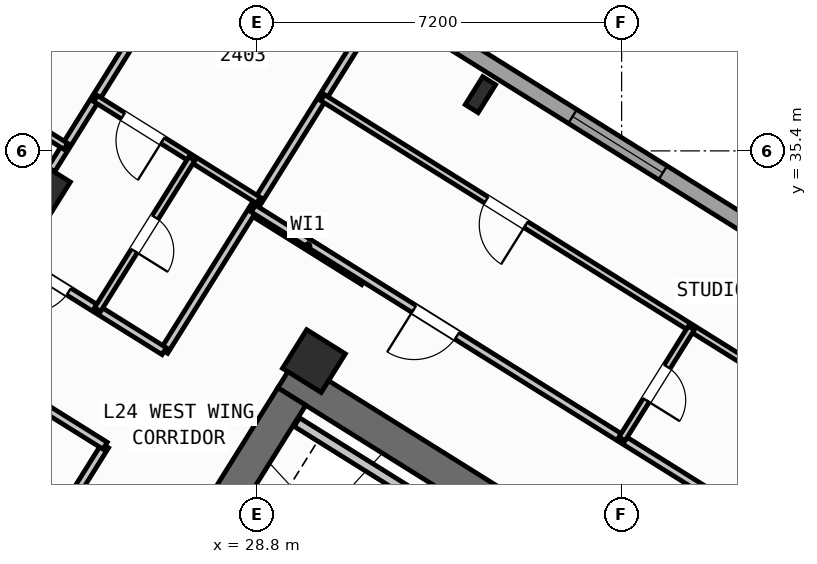
"""IFC4 building model, lengths in metres.
Left out: names, types, materials, properties, quantities, classifications, styles, units other than length and angle.
Written with IfcOpenShell. Run it as: python <this file> out.ifc"""

import sys

from ifc_helpers import new_model, si_unit, direction, frame, frame_2d, origin, origin_2d, place, context, subcontext, project, spatial, rectangle, hollow_rectangle, i_section, extrude, source, transform, mapped, element, fill, save


model = new_model("IFC4")
c1 = context("Model", 3, precision=1e-05, world=origin(), true_north=direction((0.0, 1.0)))
c2 = subcontext(c1, "Body", "Model", "MODEL_VIEW")
j1 = project(units=[si_unit("LENGTHUNIT", "METRE"), si_unit("PLANEANGLEUNIT", "RADIAN")], contexts=[c1])
p1 = place(None, origin())
s1 = spatial("IfcSite", under=j1, at=p1, CompositionType="ELEMENT")
p2 = place(p1, origin())
s2 = spatial("IfcBuilding", under=s1, at=p2, CompositionType="ELEMENT")
p3 = place(p2, frame((0.0, 0.0, 97.2)))
s3 = spatial("IfcBuildingStorey", under=s2, at=p3, CompositionType="ELEMENT", Elevation=97.2)
p4 = place(p3, frame((40.615, 23.983, 0.0), z_axis=(0.0, 0.0, 1.0), x_axis=(-0.848045953968, 0.529922692436, 0.0)))
e1 = element("IfcWall", 1, at=p4, inside=s3, PredefinedType="SHEAR", context=c2, shape_type="SweptSolid", body=[
    extrude(rectangle(XDim=13.24, YDim=0.65, at=frame_2d((6.62, 0.0))), origin(), (0.0, 0.0, 1.0), 3.32),
])
p5 = place(p3, frame((29.491, 30.552, 0.0), z_axis=(0.0, 0.0, 1.0), x_axis=(-0.529893103397, -0.8480644427, 0.0)))
e2 = element("IfcWall", 2, at=p5, inside=s3, PredefinedType="SHEAR", context=c2, shape_type="SweptSolid", body=[
    extrude(rectangle(XDim=3.525, YDim=0.65, at=frame_2d((1.763, 0.0))), origin(), (0.0, 0.0, 1.0), 3.32),
])
m1 = source(origin(), c2, "Body", "SweptSolid", [
    extrude(i_section(OverallWidth=0.3, OverallDepth=0.65, WebThickness=0.016, FlangeThickness=0.031, at=origin_2d()), origin(), (0.0, 0.0, 1.0), 3.6),
])
p6 = place(p3, frame((33.213, 36.509, 0.0), z_axis=(0.0, 0.0, 1.0), x_axis=(-0.848048096156, 0.529919264233, 0.0)))
e3 = element("IfcColumn", 3, at=p6, inside=s3, PredefinedType="COLUMN", context=c2, shape_type="MappedRepresentation", body=[
    mapped(m1, transform((0.0, 0.0, 0.0), scale=1.0)),
])
m2 = source(origin(), c2, "Body", "SweptSolid", [
    extrude(hollow_rectangle(XDim=0.9, YDim=0.9, WallThickness=0.036, at=origin_2d()), origin(), (0.0, 0.0, 1.0), 3.6),
])
for number, where, z_axis, x_axis in (
    (4, (29.928, 31.251, 0.0), (0.0, 0.0, 1.0), (-0.848, 0.53, 0.0)),
    (5, (24.5, 34.643, 0.0), (0.0, 0.0, 1.0), (-0.848, 0.53, 0.0)),
):
    element("IfcColumn", number, at=place(p3, frame(where, z_axis=z_axis, x_axis=x_axis)), inside=s3, PredefinedType="COLUMN", context=c2, shape_type="MappedRepresentation", body=[
        mapped(m2, transform((0.0, 0.0, 0.0), scale=1.0)),
    ])
p7 = place(p3, frame((17.424, 47.083, 0.0), z_axis=(0.0, 0.0, 1.0), x_axis=(0.848049927979, -0.529916332693, 0.0)))
e6 = element("IfcWall", 6, at=p7, inside=s3, PredefinedType="STANDARD", context=c2, shape_type="SweptSolid", body=[
    extrude(rectangle(XDim=29.223, YDim=0.32, at=frame_2d((14.612, 0.0))), origin(), (0.0, 0.0, 1.0), 3.32),
])
p8 = place(p7, frame((3.745, 0.0, 0.0)))
e7 = element("IfcOpeningElement", 7, at=p8, cuts=e6, PredefinedType="OPENING", context=c2, shape_type="SweptSolid", body=[
    extrude(rectangle(XDim=1.05, YDim=2.15, at=frame_2d((0.525, 1.075))), frame((0.0, 0.17, 0.0), z_axis=(0.0, -1.0, 0.0), x_axis=(1.0, 0.0, 0.0)), (0.0, 0.0, 1.0), 0.34),
])
p9 = place(p7, frame((0.699, 0.0, 0.95)))
e8 = element("IfcOpeningElement", 8, at=p9, cuts=e6, PredefinedType="OPENING", context=c2, shape_type="SweptSolid", body=[
    extrude(rectangle(XDim=1.2, YDim=1.4, at=frame_2d((0.6, 0.7))), frame((0.0, 0.17, 0.0), z_axis=(0.0, -1.0, 0.0), x_axis=(1.0, 0.0, 0.0)), (0.0, 0.0, 1.0), 0.34),
])
p10 = place(p7, frame((6.951, 0.0, 1.0)))
e9 = element("IfcOpeningElement", 9, at=p10, cuts=e6, PredefinedType="OPENING", context=c2, shape_type="SweptSolid", body=[
    extrude(rectangle(XDim=0.9, YDim=1.25, at=frame_2d((0.45, 0.625))), frame((0.0, 0.17, 0.0), z_axis=(0.0, -1.0, 0.0), x_axis=(1.0, 0.0, 0.0)), (0.0, 0.0, 1.0), 0.34),
])
p11 = place(p7, frame((9.841, 0.0, 0.85)))
e10 = element("IfcOpeningElement", 10, at=p11, cuts=e6, PredefinedType="OPENING", context=c2, shape_type="SweptSolid", body=[
    extrude(rectangle(XDim=1.5, YDim=1.5, at=frame_2d((0.75, 0.75))), frame((0.0, 0.17, 0.0), z_axis=(0.0, -1.0, 0.0), x_axis=(1.0, 0.0, 0.0)), (0.0, 0.0, 1.0), 0.34),
])
p12 = place(p7, frame((13.889, 0.0, 0.95)))
e11 = element("IfcOpeningElement", 11, at=p12, cuts=e6, PredefinedType="OPENING", context=c2, shape_type="SweptSolid", body=[
    extrude(rectangle(XDim=1.2, YDim=1.4, at=frame_2d((0.6, 0.7))), frame((0.0, 0.17, 0.0), z_axis=(0.0, -1.0, 0.0), x_axis=(1.0, 0.0, 0.0)), (0.0, 0.0, 1.0), 0.34),
])
p13 = place(p7, frame((17.254, 0.0, 1.0)))
e12 = element("IfcOpeningElement", 12, at=p13, cuts=e6, PredefinedType="OPENING", context=c2, shape_type="SweptSolid", body=[
    extrude(rectangle(XDim=0.9, YDim=1.25, at=frame_2d((0.45, 0.625))), frame((0.0, 0.17, 0.0), z_axis=(0.0, -1.0, 0.0), x_axis=(1.0, 0.0, 0.0)), (0.0, 0.0, 1.0), 0.34),
])
p14 = place(p7, frame((20.764, 0.0, 0.8)))
e13 = element("IfcOpeningElement", 13, at=p14, cuts=e6, PredefinedType="OPENING", context=c2, shape_type="SweptSolid", body=[
    extrude(rectangle(XDim=2.1, YDim=1.55, at=frame_2d((1.05, 0.775))), frame((0.0, 0.17, 0.0), z_axis=(0.0, -1.0, 0.0), x_axis=(1.0, 0.0, 0.0)), (0.0, 0.0, 1.0), 0.34),
])
p15 = place(p7, frame((25.403, 0.0, 0.8)))
e14 = element("IfcOpeningElement", 14, at=p15, cuts=e6, PredefinedType="OPENING", context=c2, shape_type="SweptSolid", body=[
    extrude(rectangle(XDim=2.1, YDim=1.55, at=frame_2d((1.05, 0.775))), frame((0.0, 0.17, 0.0), z_axis=(0.0, -1.0, 0.0), x_axis=(1.0, 0.0, 0.0)), (0.0, 0.0, 1.0), 0.34),
])
p16 = place(p3, frame((33.363, 27.69, 0.0), z_axis=(0.0, 0.0, 1.0), x_axis=(-0.848053806312, 0.529910125964, 0.0)))
e15 = element("IfcWall", 15, at=p16, inside=s3, PredefinedType="STANDARD", context=c2, shape_type="SweptSolid", body=[
    extrude(rectangle(XDim=4.448, YDim=0.2, at=frame_2d((2.224, 0.0))), origin(), (0.0, 0.0, 1.0), 3.31),
])
p17 = place(p3, frame((30.914, 32.829, 0.0), z_axis=(0.0, 0.0, 1.0), x_axis=(-0.848008813643, 0.529982124211, 0.0)))
e16 = element("IfcWall", 16, at=p17, inside=s3, PredefinedType="PARTITIONING", context=c2, shape_type="SweptSolid", body=[
    extrude(rectangle(XDim=2.61, YDim=0.16, at=frame_2d((1.305, 0.0))), origin(), (0.0, 0.0, 1.0), 3.31),
])
p18 = place(p3, frame((31.239, 38.274, 0.0), z_axis=(0.0, 0.0, 1.0), x_axis=(-0.529928058306, -0.848042600947, 0.0)))
e17 = element("IfcWall", 17, at=p18, inside=s3, PredefinedType="PARTITIONING", context=c2, shape_type="SweptSolid", body=[
    extrude(rectangle(XDim=8.05, YDim=0.16, at=frame_2d((4.025, 0.0))), origin(), (0.0, 0.0, 1.0), 3.31),
])
p19 = place(p3, frame((25.807, 29.582, 0.0), z_axis=(0.0, 0.0, 1.0), x_axis=(-0.529920357077, -0.848047413271, 0.0)))
e18 = element("IfcWall", 18, at=p19, inside=s3, PredefinedType="PARTITIONING", context=c2, shape_type="SweptSolid", body=[
    extrude(rectangle(XDim=11.45, YDim=0.16, at=frame_2d((5.725, 0.0))), origin(), (0.0, 0.0, 1.0), 3.31),
])
p20 = place(p3, frame((26.973, 31.447, 0.0), z_axis=(0.0, 0.0, 1.0), x_axis=(-0.848048310262, 0.529918921593, 0.0)))
e19 = element("IfcWall", 19, at=p20, inside=s3, PredefinedType="PARTITIONING", context=c2, shape_type="SweptSolid", body=[
    extrude(rectangle(XDim=16.73, YDim=0.16, at=frame_2d((8.365, 0.0))), origin(), (0.0, 0.0, 1.0), 3.31),
])
p21 = place(p20, frame((2.22, 0.0, 0.0)))
e20 = element("IfcOpeningElement", 20, at=p21, cuts=e19, PredefinedType="OPENING", context=c2, shape_type="SweptSolid", body=[
    extrude(rectangle(XDim=0.86, YDim=2.05, at=frame_2d((0.43, 1.025))), frame((0.0, 0.09, 0.0), z_axis=(0.0, -1.0, 0.0), x_axis=(1.0, 0.0, 0.0)), (0.0, 0.0, 1.0), 0.18),
])
p22 = place(p20, frame((5.28, 0.0, 0.0)))
e21 = element("IfcOpeningElement", 21, at=p22, cuts=e19, PredefinedType="OPENING", context=c2, shape_type="SweptSolid", body=[
    extrude(rectangle(XDim=1.0, YDim=2.1, at=frame_2d((0.5, 1.05))), frame((0.0, 0.09, 0.0), z_axis=(0.0, -1.0, 0.0), x_axis=(1.0, 0.0, 0.0)), (0.0, 0.0, 1.0), 0.18),
])
p23 = place(p3, frame((25.807, 29.582, 0.0), z_axis=(0.0, 0.0, 1.0), x_axis=(-0.848052408131, 0.529912363569, 0.0)))
e22 = element("IfcWall", 22, at=p23, inside=s3, PredefinedType="PARTITIONING", context=c2, shape_type="SweptSolid", body=[
    extrude(rectangle(XDim=16.73, YDim=0.16, at=frame_2d((8.365, 0.0))), origin(), (0.0, 0.0, 1.0), 3.31),
])
p24 = place(p23, frame((2.22, 0.0, 0.0)))
e23 = element("IfcOpeningElement", 23, at=p24, cuts=e22, PredefinedType="OPENING", context=c2, shape_type="SweptSolid", body=[
    extrude(rectangle(XDim=0.86, YDim=2.05, at=frame_2d((0.43, 1.025))), frame((0.0, 0.09, 0.0), z_axis=(0.0, -1.0, 0.0), x_axis=(1.0, 0.0, 0.0)), (0.0, 0.0, 1.0), 0.18),
])
p25 = place(p23, frame((14.013, 0.0, 0.0)))
e24 = element("IfcOpeningElement", 24, at=p25, cuts=e22, PredefinedType="OPENING", context=c2, shape_type="SweptSolid", body=[
    extrude(rectangle(XDim=1.0, YDim=2.1, at=frame_2d((0.5, 1.05))), frame((0.0, 0.09, 0.0), z_axis=(0.0, -1.0, 0.0), x_axis=(1.0, 0.0, 0.0)), (0.0, 0.0, 1.0), 0.18),
])
p26 = place(p3, frame((27.607, 39.615, 0.0), z_axis=(0.0, 0.0, 1.0), x_axis=(-0.529913610495, -0.848051628978, 0.0)))
e25 = element("IfcWall", 25, at=p26, inside=s3, PredefinedType="PARTITIONING", context=c2, shape_type="SweptSolid", body=[
    extrude(rectangle(XDim=5.401, YDim=0.16, at=frame_2d((2.7, 0.0))), origin(), (0.0, 0.0, 1.0), 2.745),
])
p27 = place(p3, frame((28.833, 34.424, 0.0), z_axis=(0.0, 0.0, 1.0), x_axis=(-0.848059820872, 0.529900500304, 0.0)))
e26 = element("IfcWall", 26, at=p27, inside=s3, PredefinedType="PLUMBINGWALL", context=c2, shape_type="SweptSolid", body=[
    extrude(rectangle(XDim=3.79, YDim=0.14, at=frame_2d((1.895, 0.0))), origin(), (0.0, 0.0, 1.0), 3.31),
])
p28 = place(p27, frame((2.23, 0.0, 0.0)))
e27 = element("IfcOpeningElement", 27, at=p28, cuts=e26, PredefinedType="OPENING", context=c2, shape_type="SweptSolid", body=[
    extrude(rectangle(XDim=0.92, YDim=2.08, at=frame_2d((0.46, 1.04))), frame((0.0, 0.08, 0.0), z_axis=(0.0, -1.0, 0.0), x_axis=(1.0, 0.0, 0.0)), (0.0, 0.0, 1.0), 0.16),
])
p29 = place(p3, frame((27.518, 35.245, 0.0), z_axis=(0.0, 0.0, 1.0), x_axis=(-0.529948921118, -0.848029563757, 0.0)))
e28 = element("IfcWall", 28, at=p29, inside=s3, PredefinedType="PLUMBINGWALL", context=c2, shape_type="SweptSolid", body=[
    extrude(rectangle(XDim=3.51, YDim=0.14, at=frame_2d((1.755, 0.0))), origin(), (0.0, 0.0, 1.0), 2.935),
])
p30 = place(p29, frame((1.365, 0.0, 0.0)))
e29 = element("IfcOpeningElement", 29, at=p30, cuts=e28, PredefinedType="OPENING", context=c2, shape_type="SweptSolid", body=[
    extrude(rectangle(XDim=0.78, YDim=2.05, at=frame_2d((0.39, 1.025))), frame((0.0, 0.08, 0.0), z_axis=(0.0, -1.0, 0.0), x_axis=(1.0, 0.0, 0.0)), (0.0, 0.0, 1.0), 0.16),
])
p31 = place(p3, frame((24.792, 42.62, 0.0), z_axis=(0.0, 0.0, 1.0), x_axis=(-0.529925083182, -0.848044460046, 0.0)))
e30 = element("IfcWall", 30, at=p31, inside=s3, PredefinedType="PARTITIONING", context=c2, shape_type="SweptSolid", body=[
    extrude(rectangle(XDim=8.32, YDim=0.11, at=frame_2d((4.16, 0.0))), origin(), (0.0, 0.0, 1.0), 3.31),
])
p32 = place(p31, frame((4.65, 0.0, 0.0)))
e31 = element("IfcOpeningElement", 31, at=p32, cuts=e30, PredefinedType="OPENING", context=c2, shape_type="SweptSolid", body=[
    extrude(rectangle(XDim=0.78, YDim=2.05, at=frame_2d((0.39, 1.025))), frame((0.0, 0.065, 0.0), z_axis=(0.0, -1.0, 0.0), x_axis=(1.0, 0.0, 0.0)), (0.0, 0.0, 1.0), 0.13),
])
p33 = place(p3, frame((25.03, 35.491, 0.0), z_axis=(0.0, 0.0, 1.0), x_axis=(-0.848070667369, 0.52988314103, 0.0)))
e32 = element("IfcWall", 32, at=p33, inside=s3, PredefinedType="PLUMBINGWALL", context=c2, shape_type="SweptSolid", body=[
    extrude(rectangle(XDim=3.98, YDim=0.14, at=frame_2d((1.99, 0.0))), origin(), (0.0, 0.0, 1.0), 3.31),
])
p34 = place(p33, frame((1.93, 0.0, 0.0)))
e33 = element("IfcOpeningElement", 33, at=p34, cuts=e32, PredefinedType="OPENING", context=c2, shape_type="SweptSolid", body=[
    extrude(rectangle(XDim=0.92, YDim=2.08, at=frame_2d((0.46, 1.04))), frame((0.0, 0.08, 0.0), z_axis=(0.0, -1.0, 0.0), x_axis=(1.0, 0.0, 0.0)), (0.0, 0.0, 1.0), 0.16),
])
p35 = place(p3, frame((41.936, 26.012, 0.0), z_axis=(0.0, 0.0, 1.0), x_axis=(-0.848051154596, 0.529914369676, 0.0)))
e34 = element("IfcWall", 34, at=p35, inside=s3, PredefinedType="PARTITIONING", context=c2, shape_type="SweptSolid", body=[
    extrude(rectangle(XDim=15.57, YDim=0.16, at=frame_2d((7.785, 0.0))), origin(), (0.0, 0.0, 1.0), 3.31),
])
p36 = place(p35, frame((10.83, 0.0, 0.0)))
e35 = element("IfcOpeningElement", 35, at=p36, cuts=e34, PredefinedType="OPENING", context=c2, shape_type="SweptSolid", body=[
    extrude(rectangle(XDim=1.0, YDim=2.1, at=frame_2d((0.5, 1.05))), frame((0.0, 0.09, 0.0), z_axis=(0.0, -1.0, 0.0), x_axis=(1.0, 0.0, 0.0)), (0.0, 0.0, 1.0), 0.18),
])
p37 = place(p3, frame((42.226, 28.873, 0.0), z_axis=(0.0, 0.0, 1.0), x_axis=(-0.848049134363, 0.529917602752, 0.0)))
e36 = element("IfcWall", 36, at=p37, inside=s3, PredefinedType="PLUMBINGWALL", context=c2, shape_type="SweptSolid", body=[
    extrude(rectangle(XDim=14.3, YDim=0.14, at=frame_2d((7.15, 0.0))), origin(), (0.0, 0.0, 1.0), 3.31),
])
p38 = place(p37, frame((9.57, 0.0, 0.0)))
e37 = element("IfcOpeningElement", 37, at=p38, cuts=e36, PredefinedType="OPENING", context=c2, shape_type="SweptSolid", body=[
    extrude(rectangle(XDim=0.92, YDim=2.08, at=frame_2d((0.46, 1.04))), frame((0.0, 0.08, 0.0), z_axis=(0.0, -1.0, 0.0), x_axis=(1.0, 0.0, 0.0)), (0.0, 0.0, 1.0), 0.16),
])
p39 = place(p3, frame((37.375, 31.904, 0.0), z_axis=(0.0, 0.0, 1.0), x_axis=(-0.529913878929, -0.848051461244, 0.0)))
e38 = element("IfcWall", 38, at=p39, inside=s3, PredefinedType="PLUMBINGWALL", context=c2, shape_type="SweptSolid", body=[
    extrude(rectangle(XDim=2.58, YDim=0.14, at=frame_2d((1.29, 0.0))), origin(), (0.0, 0.0, 1.0), 3.31),
])
p40 = place(p39, frame((0.9, 0.0, 0.0)))
e39 = element("IfcOpeningElement", 39, at=p40, cuts=e38, PredefinedType="OPENING", context=c2, shape_type="SweptSolid", body=[
    extrude(rectangle(XDim=0.78, YDim=2.05, at=frame_2d((0.39, 1.025))), frame((0.0, 0.08, 0.0), z_axis=(0.0, -1.0, 0.0), x_axis=(1.0, 0.0, 0.0)), (0.0, 0.0, 1.0), 0.16),
])
m3 = source(origin(), c2, "Body", "SweptSolid", [
    extrude(rectangle(XDim=2.1, YDim=1.55, at=frame_2d((1.05, 0.775))), frame((0.0, 0.03, 0.0), z_axis=(0.0, -1.0, 0.0), x_axis=(1.0, 0.0, 0.0)), (0.0, 0.0, 1.0), 0.06),
])
p41 = place(p14, origin())
e40 = element("IfcWindow", 40, at=p41, inside=s3, PartitioningType="SINGLE_PANEL", PredefinedType="WINDOW", context=c2, shape_type="MappedRepresentation", body=[
    mapped(m3, transform((0.0, 0.0, 0.0), scale=1.0)),
])
fill(e13, e40)
m4 = source(origin(), c2, "Body", "SweptSolid", [
    extrude(rectangle(XDim=0.86, YDim=2.05, at=frame_2d((0.43, 1.025))), frame((0.0, 0.025, 0.0), z_axis=(0.0, -1.0, 0.0), x_axis=(1.0, 0.0, 0.0)), (0.0, 0.0, 1.0), 0.05),
])
p42 = place(p21, origin())
e41 = element("IfcDoor", 41, at=p42, inside=s3, OperationType="SINGLE_SWING_RIGHT", PredefinedType="DOOR", context=c2, shape_type="MappedRepresentation", body=[
    mapped(m4, transform((0.0, 0.0, 0.0), scale=1.0)),
])
fill(e20, e41)
m5 = source(origin(), c2, "Body", "SweptSolid", [
    extrude(rectangle(XDim=0.92, YDim=2.08, at=frame_2d((0.46, 1.04))), frame((0.0, 0.025, 0.0), z_axis=(0.0, -1.0, 0.0), x_axis=(1.0, 0.0, 0.0)), (0.0, 0.0, 1.0), 0.05),
])
p43 = place(p28, origin())
e42 = element("IfcDoor", 42, at=p43, inside=s3, OperationType="SINGLE_SWING_LEFT", PredefinedType="DOOR", context=c2, shape_type="MappedRepresentation", body=[
    mapped(m5, transform((0.0, 0.0, 0.0), scale=1.0)),
])
fill(e27, e42)
m6 = source(origin(), c2, "Body", "SweptSolid", [
    extrude(rectangle(XDim=0.78, YDim=2.05, at=frame_2d((0.39, 1.025))), frame((0.0, 0.025, 0.0), z_axis=(0.0, -1.0, 0.0), x_axis=(1.0, 0.0, 0.0)), (0.0, 0.0, 1.0), 0.05),
])
p44 = place(p30, origin())
e43 = element("IfcDoor", 43, at=p44, inside=s3, OperationType="SINGLE_SWING_RIGHT", PredefinedType="DOOR", context=c2, shape_type="MappedRepresentation", body=[
    mapped(m6, transform((0.0, 0.0, 0.0), scale=1.0)),
])
fill(e29, e43)
m7 = source(origin(), c2, "Body", "SweptSolid", [
    extrude(rectangle(XDim=1.0, YDim=2.1, at=frame_2d((0.5, 1.05))), frame((0.0, 0.025, 0.0), z_axis=(0.0, -1.0, 0.0), x_axis=(1.0, 0.0, 0.0)), (0.0, 0.0, 1.0), 0.05),
])
p45 = place(p36, origin())
e44 = element("IfcDoor", 44, at=p45, inside=s3, OperationType="SINGLE_SWING_RIGHT", PredefinedType="DOOR", context=c2, shape_type="MappedRepresentation", body=[
    mapped(m7, transform((0.0, 0.0, 0.0), scale=1.0)),
])
fill(e35, e44)
p46 = place(p38, origin())
e45 = element("IfcDoor", 45, at=p46, inside=s3, OperationType="SINGLE_SWING_LEFT", PredefinedType="DOOR", context=c2, shape_type="MappedRepresentation", body=[
    mapped(m5, transform((0.0, 0.0, 0.0), scale=1.0)),
])
fill(e37, e45)
p47 = place(p40, origin())
e46 = element("IfcDoor", 46, at=p47, inside=s3, OperationType="SINGLE_SWING_RIGHT", PredefinedType="DOOR", context=c2, shape_type="MappedRepresentation", body=[
    mapped(m6, transform((0.0, 0.0, 0.0), scale=1.0)),
])
fill(e39, e46)
save(model, sys.argv[1])
